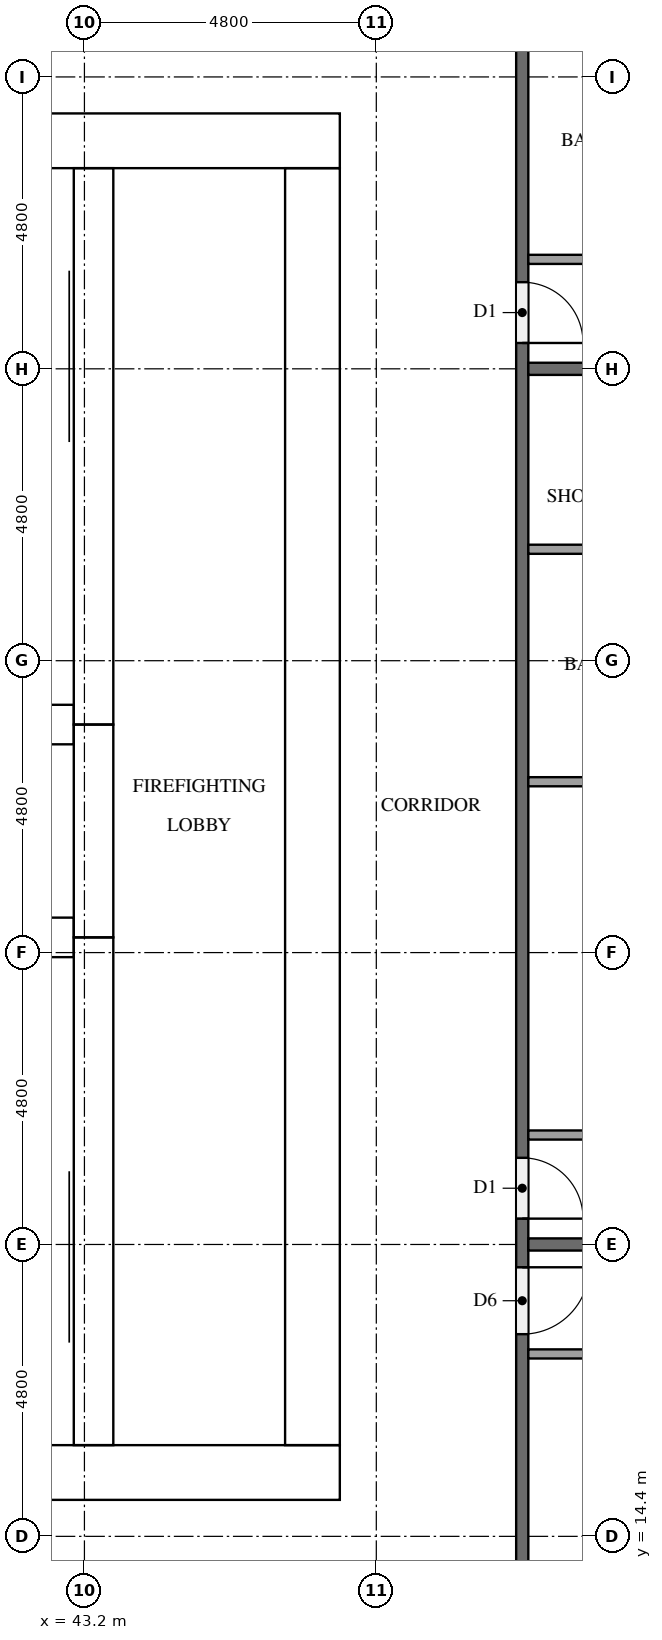
"""IFC4 building model, lengths in metres.
Left out: names, types, materials, properties, quantities, classifications, styles, units other than length and angle.
Written with IfcOpenShell. Run it as: python <this file> out.ifc"""

import sys

from ifc_helpers import new_model, si_unit, direction, frame, frame_2d, origin, place, context, subcontext, project, spatial, rectangle, extrude, element, fill, save


model = new_model("IFC4")
c1 = context("Model", 3, precision=1e-05, world=origin(), true_north=direction((0.0, 1.0)))
c2 = subcontext(c1, "Body", "Model", "MODEL_VIEW")
j1 = project(units=[si_unit("LENGTHUNIT", "METRE"), si_unit("PLANEANGLEUNIT", "RADIAN")], contexts=[c1])
p1 = place(None, origin())
s1 = spatial("IfcSite", under=j1, at=p1, CompositionType="ELEMENT")
p2 = place(p1, origin())
s2 = spatial("IfcBuilding", under=s1, at=p2, CompositionType="ELEMENT")
p3 = place(p2, frame((0.0, 0.0, 69.8)))
s3 = spatial("IfcBuildingStorey", under=s2, at=p3, CompositionType="ELEMENT", Elevation=69.8)
p4 = place(p3, frame((15.0, 15.45, 0.0), z_axis=(0.0, 0.0, 1.0), x_axis=(1.0, 0.0, 0.0)))
e1 = element("IfcWall", 1, at=p4, inside=s3, PredefinedType="SHEAR", context=c2, shape_type="SweptSolid", body=[
    extrude(rectangle(XDim=32.4, YDim=0.9, at=frame_2d((16.2, 0.0))), origin(), (0.0, 0.0, 1.0), 3.2),
])
p5 = place(p4, frame((15.3, 0.0, 0.0)))
e2 = element("IfcOpeningElement", 2, at=p5, cuts=e1, PredefinedType="OPENING", context=c2, shape_type="SweptSolid", body=[
    extrude(rectangle(XDim=1.8, YDim=2.1, at=frame_2d((0.9, 1.05))), frame((0.0, 0.46, 0.0), z_axis=(0.0, -1.0, 0.0), x_axis=(1.0, 0.0, 0.0)), (0.0, 0.0, 1.0), 0.92),
])
p6 = place(p3, frame((15.0, 37.35, 0.0), z_axis=(0.0, 0.0, 1.0), x_axis=(1.0, 0.0, 0.0)))
e3 = element("IfcWall", 3, at=p6, inside=s3, PredefinedType="SHEAR", context=c2, shape_type="SweptSolid", body=[
    extrude(rectangle(XDim=32.4, YDim=0.9, at=frame_2d((16.2, 0.0))), origin(), (0.0, 0.0, 1.0), 3.2),
])
p7 = place(p6, frame((15.3, 0.0, 0.0)))
e4 = element("IfcOpeningElement", 4, at=p7, cuts=e3, PredefinedType="OPENING", context=c2, shape_type="SweptSolid", body=[
    extrude(rectangle(XDim=1.8, YDim=2.1, at=frame_2d((0.9, 1.05))), frame((0.0, 0.46, 0.0), z_axis=(0.0, -1.0, 0.0), x_axis=(1.0, 0.0, 0.0)), (0.0, 0.0, 1.0), 0.92),
])
p8 = place(p6, frame((1.794, 0.0, 0.0)))
e5 = element("IfcOpeningElement", 5, at=p8, cuts=e3, PredefinedType="OPENING", context=c2, shape_type="SweptSolid", body=[
    extrude(rectangle(XDim=1.0, YDim=2.1, at=frame_2d((0.5, 1.05))), frame((0.0, 0.46, 0.0), z_axis=(0.0, -1.0, 0.0), x_axis=(1.0, 0.0, 0.0)), (0.0, 0.0, 1.0), 0.92),
])
p9 = place(p6, frame((5.331, 0.0, 0.0)))
e6 = element("IfcOpeningElement", 6, at=p9, cuts=e3, PredefinedType="OPENING", context=c2, shape_type="SweptSolid", body=[
    extrude(rectangle(XDim=1.0, YDim=2.1, at=frame_2d((0.5, 1.05))), frame((0.0, 0.46, 0.0), z_axis=(0.0, -1.0, 0.0), x_axis=(1.0, 0.0, 0.0)), (0.0, 0.0, 1.0), 0.92),
])
p10 = place(p3, frame((46.95, 15.9, 0.0), z_axis=(0.0, 0.0, 1.0), x_axis=(0.0, 1.0, 0.0)))
e7 = element("IfcWall", 7, at=p10, inside=s3, PredefinedType="SHEAR", context=c2, shape_type="SweptSolid", body=[
    extrude(rectangle(XDim=21.0, YDim=0.9, at=frame_2d((10.5, 0.0))), origin(), (0.0, 0.0, 1.0), 3.2),
])
p11 = place(p10, frame((10.2, 0.0, 0.0)))
e8 = element("IfcOpeningElement", 8, at=p11, cuts=e7, PredefinedType="OPENING", context=c2, shape_type="SweptSolid", body=[
    extrude(rectangle(XDim=1.2, YDim=2.1, at=frame_2d((0.6, 1.05))), frame((0.0, 0.46, 0.0), z_axis=(0.0, -1.0, 0.0), x_axis=(1.0, 0.0, 0.0)), (0.0, 0.0, 1.0), 0.92),
])
p12 = place(p3, frame((43.35, 15.9, 0.0), z_axis=(0.0, 0.0, 1.0), x_axis=(0.0, 1.0, 0.0)))
e9 = element("IfcWall", 9, at=p12, inside=s3, PredefinedType="SHEAR", context=c2, shape_type="SweptSolid", body=[
    extrude(rectangle(XDim=8.35, YDim=0.65, at=frame_2d((4.175, 0.0))), origin(), (0.0, 0.0, 1.0), 3.2),
])
p13 = place(p12, frame((0.3, 0.0, 0.0)))
e10 = element("IfcOpeningElement", 10, at=p13, cuts=e9, PredefinedType="OPENING", context=c2, shape_type="SweptSolid", body=[
    extrude(rectangle(XDim=1.2, YDim=2.1, at=frame_2d((0.6, 1.05))), frame((0.0, 0.335, 0.0), z_axis=(0.0, -1.0, 0.0), x_axis=(1.0, 0.0, 0.0)), (0.0, 0.0, 1.0), 0.67),
])
p14 = place(p3, frame((43.35, 24.25, 0.0), z_axis=(0.0, 0.0, 1.0), x_axis=(0.0, 1.0, 0.0)))
e11 = element("IfcWall", 11, at=p14, inside=s3, PredefinedType="SHEAR", context=c2, shape_type="SweptSolid", body=[
    extrude(rectangle(XDim=3.5, YDim=0.65, at=frame_2d((1.75, 0.0))), origin(), (0.0, 0.0, 1.0), 3.2),
])
p15 = place(p14, frame((1.2, 0.0, 0.0)))
e12 = element("IfcOpeningElement", 12, at=p15, cuts=e11, PredefinedType="OPENING", context=c2, shape_type="SweptSolid", body=[
    extrude(rectangle(XDim=1.1, YDim=2.1, at=frame_2d((0.55, 1.05))), frame((0.0, 0.335, 0.0), z_axis=(0.0, -1.0, 0.0), x_axis=(1.0, 0.0, 0.0)), (0.0, 0.0, 1.0), 0.67),
])
p16 = place(p3, frame((43.35, 27.75, 0.0), z_axis=(0.0, 0.0, 1.0), x_axis=(0.0, 1.0, 0.0)))
e13 = element("IfcWall", 13, at=p16, inside=s3, PredefinedType="SHEAR", context=c2, shape_type="SweptSolid", body=[
    extrude(rectangle(XDim=9.15, YDim=0.65, at=frame_2d((4.575, 0.0))), origin(), (0.0, 0.0, 1.0), 3.2),
])
p17 = place(p16, frame((7.65, 0.0, 0.0)))
e14 = element("IfcOpeningElement", 14, at=p17, cuts=e13, PredefinedType="OPENING", context=c2, shape_type="SweptSolid", body=[
    extrude(rectangle(XDim=1.2, YDim=2.1, at=frame_2d((0.6, 1.05))), frame((0.0, 0.335, 0.0), z_axis=(0.0, -1.0, 0.0), x_axis=(1.0, 0.0, 0.0)), (0.0, 0.0, 1.0), 0.67),
])
for number, where, z_axis, x_axis in (
    (15, (39.625, 24.25, 0.0), (0.0, 0.0, 1.0), (1.0, 0.0, 0.0)),
    (16, (39.625, 27.75, 0.0), (0.0, 0.0, 1.0), (1.0, 0.0, 0.0)),
):
    element("IfcWall", number, at=place(p3, frame(where, z_axis=z_axis, x_axis=x_axis)), inside=s3, PredefinedType="SHEAR", context=c2, shape_type="SweptSolid", body=[
        extrude(rectangle(XDim=3.4, YDim=0.65, at=frame_2d((1.7, 0.0))), origin(), (0.0, 0.0, 1.0), 3.2),
    ])
p18 = place(p3, frame((50.4, 40.7, 0.0), z_axis=(0.0, 0.0, 1.0), x_axis=(0.0, -1.0, 0.0)))
e17 = element("IfcWall", 17, at=p18, inside=s3, PredefinedType="PARTITIONING", context=c2, shape_type="SweptSolid", body=[
    extrude(rectangle(XDim=28.6, YDim=0.2, at=frame_2d((14.3, 0.0))), origin(), (0.0, 0.0, 1.0), 3.2),
])
p19 = place(p18, frame((21.875, 0.0, 0.0)))
e18 = element("IfcOpeningElement", 18, at=p19, cuts=e17, PredefinedType="OPENING", context=c2, shape_type="SweptSolid", body=[
    extrude(rectangle(XDim=1.1, YDim=2.1, at=frame_2d((0.55, 1.05))), frame((0.0, 0.11, 0.0), z_axis=(0.0, -1.0, 0.0), x_axis=(1.0, 0.0, 0.0)), (0.0, 0.0, 1.0), 0.22),
])
p20 = place(p18, frame((20.075, 0.0, 0.0)))
e19 = element("IfcOpeningElement", 19, at=p20, cuts=e17, PredefinedType="OPENING", context=c2, shape_type="SweptSolid", body=[
    extrude(rectangle(XDim=1.0, YDim=2.1, at=frame_2d((0.5, 1.05))), frame((0.0, 0.11, 0.0), z_axis=(0.0, -1.0, 0.0), x_axis=(1.0, 0.0, 0.0)), (0.0, 0.0, 1.0), 0.22),
])
p21 = place(p18, frame((5.675, 0.0, 0.0)))
e20 = element("IfcOpeningElement", 20, at=p21, cuts=e17, PredefinedType="OPENING", context=c2, shape_type="SweptSolid", body=[
    extrude(rectangle(XDim=1.0, YDim=2.1, at=frame_2d((0.5, 1.05))), frame((0.0, 0.11, 0.0), z_axis=(0.0, -1.0, 0.0), x_axis=(1.0, 0.0, 0.0)), (0.0, 0.0, 1.0), 0.22),
])
p22 = place(p3, frame((50.5, 19.2, 0.0), z_axis=(0.0, 0.0, 1.0), x_axis=(1.0, 0.0, 0.0)))
e21 = element("IfcWall", 21, at=p22, inside=s3, PredefinedType="PARTITIONING", context=c2, shape_type="SweptSolid", body=[
    extrude(rectangle(XDim=11.8, YDim=0.2, at=frame_2d((5.9, 0.0))), origin(), (0.0, 0.0, 1.0), 3.2),
])
p23 = place(p3, frame((50.5, 33.6, 0.0), z_axis=(0.0, 0.0, 1.0), x_axis=(1.0, 0.0, 0.0)))
e22 = element("IfcWall", 22, at=p23, inside=s3, PredefinedType="PARTITIONING", context=c2, shape_type="SweptSolid", body=[
    extrude(rectangle(XDim=11.475, YDim=0.2, at=frame_2d((5.738, 0.0))), origin(), (0.0, 0.0, 1.0), 3.2),
])
p24 = place(p3, frame((50.5, 17.4, 0.0), z_axis=(0.0, 0.0, 1.0), x_axis=(1.0, 0.0, 0.0)))
e23 = element("IfcWall", 23, at=p24, inside=s3, PredefinedType="PARTITIONING", context=c2, shape_type="SweptSolid", body=[
    extrude(rectangle(XDim=4.025, YDim=0.15, at=frame_2d((2.012, 0.0))), origin(), (0.0, 0.0, 1.0), 3.2),
])
for number, where, z_axis, x_axis in (
    (24, (50.5, 26.81, 0.0), (0.0, 0.0, 1.0), (1.0, 0.0, 0.0)),
    (25, (50.5, 30.633, 0.0), (0.0, 0.0, 1.0), (1.0, 0.0, 0.0)),
):
    element("IfcWall", number, at=place(p3, frame(where, z_axis=z_axis, x_axis=x_axis)), inside=s3, PredefinedType="PARTITIONING", context=c2, shape_type="SweptSolid", body=[
        extrude(rectangle(XDim=4.325, YDim=0.15, at=frame_2d((2.163, 0.0))), origin(), (0.0, 0.0, 1.0), 3.2),
    ])
p25 = place(p3, frame((50.5, 21.0, 0.0), z_axis=(0.0, 0.0, 1.0), x_axis=(1.0, 0.0, 0.0)))
e26 = element("IfcWall", 26, at=p25, inside=s3, PredefinedType="PARTITIONING", context=c2, shape_type="SweptSolid", body=[
    extrude(rectangle(XDim=4.475, YDim=0.15, at=frame_2d((2.238, 0.0))), origin(), (0.0, 0.0, 1.0), 3.2),
])
p26 = place(p3, frame((50.5, 35.4, 0.0), z_axis=(0.0, 0.0, 1.0), x_axis=(1.0, 0.0, 0.0)))
e27 = element("IfcWall", 27, at=p26, inside=s3, PredefinedType="PARTITIONING", context=c2, shape_type="SweptSolid", body=[
    extrude(rectangle(XDim=3.725, YDim=0.15, at=frame_2d((1.863, 0.0))), origin(), (0.0, 0.0, 1.0), 3.2),
])
p27 = place(p15, origin())
e28 = element("IfcDoor", 28, at=p27, inside=s3, OperationType="DOUBLE_DOOR_SLIDING", PredefinedType="DOOR", context=c2, shape_type="SweptSolid", body=[
    extrude(rectangle(XDim=1.1, YDim=2.1, at=frame_2d((0.55, 1.05))), frame((0.0, 0.025, 0.0), z_axis=(0.0, -1.0, 0.0), x_axis=(1.0, 0.0, 0.0)), (0.0, 0.0, 1.0), 0.05),
])
fill(e12, e28)
p28 = place(p13, origin())
e29 = element("IfcDoor", 29, at=p28, inside=s3, OperationType="SINGLE_SWING_RIGHT", PredefinedType="DOOR", context=c2, shape_type="SweptSolid", body=[
    extrude(rectangle(XDim=1.2, YDim=2.1, at=frame_2d((0.6, 1.05))), frame((0.0, 0.025, 0.0), z_axis=(0.0, -1.0, 0.0), x_axis=(1.0, 0.0, 0.0)), (0.0, 0.0, 1.0), 0.05),
])
fill(e10, e29)
p29 = place(p17, origin())
e30 = element("IfcDoor", 30, at=p29, inside=s3, OperationType="SINGLE_SWING_LEFT", PredefinedType="DOOR", context=c2, shape_type="SweptSolid", body=[
    extrude(rectangle(XDim=1.2, YDim=2.1, at=frame_2d((0.6, 1.05))), frame((0.0, 0.025, 0.0), z_axis=(0.0, -1.0, 0.0), x_axis=(1.0, 0.0, 0.0)), (0.0, 0.0, 1.0), 0.05),
])
fill(e14, e30)
p30 = place(p11, origin())
e31 = element("IfcDoor", 31, at=p30, inside=s3, OperationType="SINGLE_SWING_LEFT", PredefinedType="DOOR", context=c2, shape_type="SweptSolid", body=[
    extrude(rectangle(XDim=1.2, YDim=2.1, at=frame_2d((0.6, 1.05))), frame((0.0, 0.025, 0.0), z_axis=(0.0, -1.0, 0.0), x_axis=(1.0, 0.0, 0.0)), (0.0, 0.0, 1.0), 0.05),
])
fill(e8, e31)
p31 = place(p19, origin())
e32 = element("IfcDoor", 32, at=p31, inside=s3, OperationType="SINGLE_SWING_LEFT", PredefinedType="DOOR", context=c2, shape_type="SweptSolid", body=[
    extrude(rectangle(XDim=1.1, YDim=2.1, at=frame_2d((0.55, 1.05))), frame((0.0, 0.025, 0.0), z_axis=(0.0, -1.0, 0.0), x_axis=(1.0, 0.0, 0.0)), (0.0, 0.0, 1.0), 0.05),
])
fill(e18, e32)
p32 = place(p20, origin())
e33 = element("IfcDoor", 33, at=p32, inside=s3, OperationType="SINGLE_SWING_RIGHT", PredefinedType="DOOR", context=c2, shape_type="SweptSolid", body=[
    extrude(rectangle(XDim=1.0, YDim=2.1, at=frame_2d((0.5, 1.05))), frame((0.0, 0.025, 0.0), z_axis=(0.0, -1.0, 0.0), x_axis=(1.0, 0.0, 0.0)), (0.0, 0.0, 1.0), 0.05),
])
fill(e19, e33)
p33 = place(p21, origin())
e34 = element("IfcDoor", 34, at=p33, inside=s3, OperationType="SINGLE_SWING_RIGHT", PredefinedType="DOOR", context=c2, shape_type="SweptSolid", body=[
    extrude(rectangle(XDim=1.0, YDim=2.1, at=frame_2d((0.5, 1.05))), frame((0.0, 0.025, 0.0), z_axis=(0.0, -1.0, 0.0), x_axis=(1.0, 0.0, 0.0)), (0.0, 0.0, 1.0), 0.05),
])
fill(e20, e34)
save(model, sys.argv[1])
